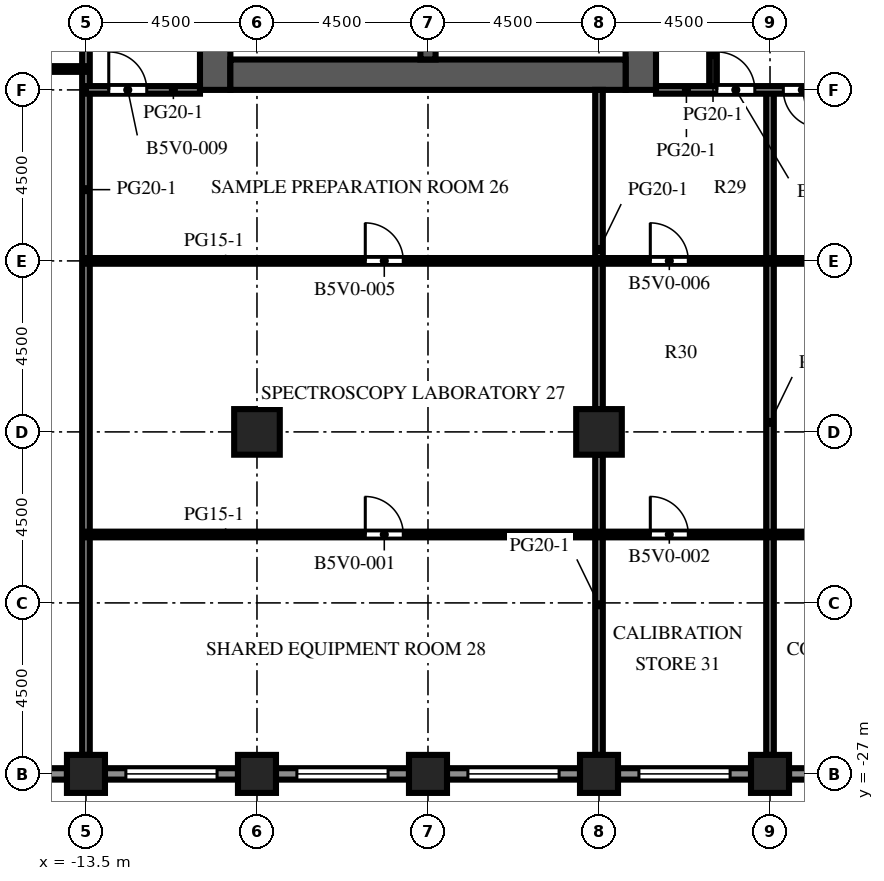
"""IFC4 building model, lengths in metres.
Left out: names, types, materials, properties, quantities, classifications, styles, units other than length and angle.
Written with IfcOpenShell. Run it as: python <this file> out.ifc"""

import sys

from ifc_helpers import new_model, si_unit, direction, frame, frame_2d, origin, origin_2d, place, context, subcontext, project, spatial, rectangle, extrude, element, fill, save


model = new_model("IFC4")
c1 = context("Model", 3, precision=1e-05, world=origin(), true_north=direction((0.0, 1.0)))
c2 = subcontext(c1, "Body", "Model", "MODEL_VIEW")
j1 = project(units=[si_unit("LENGTHUNIT", "METRE"), si_unit("PLANEANGLEUNIT", "RADIAN")], contexts=[c1])
p1 = place(None, origin())
s1 = spatial("IfcSite", under=j1, at=p1, CompositionType="ELEMENT")
p2 = place(p1, origin())
s2 = spatial("IfcBuilding", under=s1, at=p2, CompositionType="ELEMENT")
p3 = place(p2, frame((0.0, 0.0, 160.9)))
s3 = spatial("IfcBuildingStorey", under=s2, at=p3, CompositionType="ELEMENT", Elevation=160.9)
for number, where, z_axis, x_axis in (
    (1, (-13.5, -27.0, 0.0), (0.0, 0.0, 1.0), (1.0, 0.0, 0.0)),
    (2, (-9.0, -27.0, 0.0), (0.0, 0.0, 1.0), (1.0, 0.0, 0.0)),
    (3, (-4.5, -27.0, 0.0), (0.0, 0.0, 1.0), (1.0, 0.0, 0.0)),
    (4, (0.0, -27.0, 0.0), (0.0, 0.0, 1.0), (1.0, 0.0, 0.0)),
    (5, (4.5, -27.0, 0.0), (0.0, 0.0, 1.0), (1.0, 0.0, 0.0)),
):
    element("IfcColumn", number, at=place(p3, frame(where, z_axis=z_axis, x_axis=x_axis)), inside=s3, PredefinedType="COLUMN", context=c2, shape_type="SweptSolid", body=[
        extrude(rectangle(XDim=1.0, YDim=1.0, at=origin_2d()), origin(), (0.0, 0.0, 1.0), 4.1),
    ])
for number, where, z_axis, x_axis in (
    (6, (-9.0, -18.0, 0.0), (0.0, 0.0, 1.0), (1.0, 0.0, 0.0)),
    (7, (0.0, -18.0, 0.0), (0.0, 0.0, 1.0), (1.0, 0.0, 0.0)),
):
    element("IfcColumn", number, at=place(p3, frame(where, z_axis=z_axis, x_axis=x_axis)), inside=s3, PredefinedType="COLUMN", context=c2, shape_type="SweptSolid", body=[
        extrude(rectangle(XDim=1.2, YDim=1.2, at=origin_2d()), origin(), (0.0, 0.0, 1.0), 4.1),
    ])
p4 = place(p3, frame((-10.1, -9.0, 0.0), z_axis=(0.0, 0.0, 1.0), x_axis=(0.0, 1.0, 0.0)))
e8 = element("IfcWall", 8, at=p4, inside=s3, PredefinedType="SHEAR", context=c2, shape_type="SweptSolid", body=[
    extrude(rectangle(XDim=27.5, YDim=0.8, at=frame_2d((13.75, 0.0))), origin(), (0.0, 0.0, 1.0), 4.1),
])
p5 = place(p4, frame((12.55, 0.0, 0.0)))
e9 = element("IfcOpeningElement", 9, at=p5, cuts=e8, PredefinedType="OPENING", context=c2, shape_type="SweptSolid", body=[
    extrude(rectangle(XDim=2.4, YDim=2.4, at=frame_2d((1.2, 1.2))), frame((0.0, 0.41, 0.0), z_axis=(0.0, -1.0, 0.0), x_axis=(1.0, 0.0, 0.0)), (0.0, 0.0, 1.0), 0.82),
])
p6 = place(p4, frame((6.825, 0.0, 0.0)))
e10 = element("IfcOpeningElement", 10, at=p6, cuts=e8, PredefinedType="OPENING", context=c2, shape_type="SweptSolid", body=[
    extrude(rectangle(XDim=1.2, YDim=2.1, at=frame_2d((0.6, 1.05))), frame((0.0, 0.41, 0.0), z_axis=(0.0, -1.0, 0.0), x_axis=(1.0, 0.0, 0.0)), (0.0, 0.0, 1.0), 0.82),
])
p7 = place(p4, frame((19.475, 0.0, 0.0)))
e11 = element("IfcOpeningElement", 11, at=p7, cuts=e8, PredefinedType="OPENING", context=c2, shape_type="SweptSolid", body=[
    extrude(rectangle(XDim=1.2, YDim=2.1, at=frame_2d((0.6, 1.05))), frame((0.0, 0.41, 0.0), z_axis=(0.0, -1.0, 0.0), x_axis=(1.0, 0.0, 0.0)), (0.0, 0.0, 1.0), 0.82),
])
p8 = place(p3, frame((1.1, -9.0, 0.0), z_axis=(0.0, 0.0, 1.0), x_axis=(0.0, 1.0, 0.0)))
e12 = element("IfcWall", 12, at=p8, inside=s3, PredefinedType="SHEAR", context=c2, shape_type="SweptSolid", body=[
    extrude(rectangle(XDim=27.5, YDim=0.8, at=frame_2d((13.75, 0.0))), origin(), (0.0, 0.0, 1.0), 4.1),
])
p9 = place(p8, frame((12.55, 0.0, 0.0)))
e13 = element("IfcOpeningElement", 13, at=p9, cuts=e12, PredefinedType="OPENING", context=c2, shape_type="SweptSolid", body=[
    extrude(rectangle(XDim=2.4, YDim=2.4, at=frame_2d((1.2, 1.2))), frame((0.0, 0.41, 0.0), z_axis=(0.0, -1.0, 0.0), x_axis=(1.0, 0.0, 0.0)), (0.0, 0.0, 1.0), 0.82),
])
p10 = place(p8, frame((5.45, 0.0, 0.0)))
e14 = element("IfcOpeningElement", 14, at=p10, cuts=e12, PredefinedType="OPENING", context=c2, shape_type="SweptSolid", body=[
    extrude(rectangle(XDim=1.2, YDim=2.1, at=frame_2d((0.6, 1.05))), frame((0.0, 0.41, 0.0), z_axis=(0.0, -1.0, 0.0), x_axis=(1.0, 0.0, 0.0)), (0.0, 0.0, 1.0), 0.82),
])
p11 = place(p8, frame((19.45, 0.0, 0.0)))
e15 = element("IfcOpeningElement", 15, at=p11, cuts=e12, PredefinedType="OPENING", context=c2, shape_type="SweptSolid", body=[
    extrude(rectangle(XDim=1.0, YDim=2.1, at=frame_2d((0.5, 1.05))), frame((0.0, 0.41, 0.0), z_axis=(0.0, -1.0, 0.0), x_axis=(1.0, 0.0, 0.0)), (0.0, 0.0, 1.0), 0.82),
])
p12 = place(p8, frame((21.137, 0.0, 0.0)))
e16 = element("IfcOpeningElement", 16, at=p12, cuts=e12, PredefinedType="OPENING", context=c2, shape_type="SweptSolid", body=[
    extrude(rectangle(XDim=1.0, YDim=2.1, at=frame_2d((0.5, 1.05))), frame((0.0, 0.41, 0.0), z_axis=(0.0, -1.0, 0.0), x_axis=(1.0, 0.0, 0.0)), (0.0, 0.0, 1.0), 0.82),
])
p13 = place(p8, frame((23.2, 0.0, 0.0)))
e17 = element("IfcOpeningElement", 17, at=p13, cuts=e12, PredefinedType="OPENING", context=c2, shape_type="SweptSolid", body=[
    extrude(rectangle(XDim=1.0, YDim=2.1, at=frame_2d((0.5, 1.05))), frame((0.0, 0.41, 0.0), z_axis=(0.0, -1.0, 0.0), x_axis=(1.0, 0.0, 0.0)), (0.0, 0.0, 1.0), 0.82),
])
p14 = place(p8, frame((25.262, 0.0, 0.0)))
e18 = element("IfcOpeningElement", 18, at=p14, cuts=e12, PredefinedType="OPENING", context=c2, shape_type="SweptSolid", body=[
    extrude(rectangle(XDim=1.0, YDim=2.1, at=frame_2d((0.5, 1.05))), frame((0.0, 0.41, 0.0), z_axis=(0.0, -1.0, 0.0), x_axis=(1.0, 0.0, 0.0)), (0.0, 0.0, 1.0), 0.82),
])
p15 = place(p3, frame((-9.7, -8.6, 0.0), z_axis=(0.0, 0.0, 1.0), x_axis=(1.0, 0.0, 0.0)))
e19 = element("IfcWall", 19, at=p15, inside=s3, PredefinedType="SHEAR", context=c2, shape_type="SweptSolid", body=[
    extrude(rectangle(XDim=10.4, YDim=0.8, at=frame_2d((5.2, 0.0))), origin(), (0.0, 0.0, 1.0), 4.1),
])
p16 = place(p3, frame((-4.5, -8.2, 0.0), z_axis=(0.0, 0.0, 1.0), x_axis=(0.0, 1.0, 0.0)))
e20 = element("IfcWall", 20, at=p16, inside=s3, PredefinedType="SHEAR", context=c2, shape_type="SweptSolid", body=[
    extrude(rectangle(XDim=7.5, YDim=0.4, at=frame_2d((3.75, 0.0))), origin(), (0.0, 0.0, 1.0), 4.1),
])
p17 = place(p3, frame((-14.0, -27.0, 0.0), z_axis=(0.0, 0.0, 1.0), x_axis=(-1.0, 0.0, 0.0)))
e21 = element("IfcWall", 21, at=p17, inside=s3, PredefinedType="SOLIDWALL", context=c2, shape_type="SweptSolid", body=[
    extrude(rectangle(XDim=3.5, YDim=0.3, at=frame_2d((1.75, 0.0))), origin(), (0.0, 0.0, 1.0), 2.85),
])
p18 = place(p17, frame((1.25, 0.0, 0.0)))
e22 = element("IfcOpeningElement", 22, at=p18, cuts=e21, PredefinedType="OPENING", context=c2, shape_type="SweptSolid", body=[
    extrude(rectangle(XDim=1.0, YDim=2.2, at=frame_2d((0.5, 1.1))), frame((0.0, 0.16, 0.0), z_axis=(0.0, -1.0, 0.0), x_axis=(1.0, 0.0, 0.0)), (0.0, 0.0, 1.0), 0.32),
])
p19 = place(p3, frame((-9.5, -27.0, 0.0), z_axis=(0.0, 0.0, 1.0), x_axis=(-1.0, 0.0, 0.0)))
e23 = element("IfcWall", 23, at=p19, inside=s3, PredefinedType="SOLIDWALL", context=c2, shape_type="SweptSolid", body=[
    extrude(rectangle(XDim=3.5, YDim=0.3, at=frame_2d((1.75, 0.0))), origin(), (0.0, 0.0, 1.0), 2.85),
])
p20 = place(p19, frame((0.55, 0.0, 0.8)))
e24 = element("IfcOpeningElement", 24, at=p20, cuts=e23, PredefinedType="OPENING", context=c2, shape_type="SweptSolid", body=[
    extrude(rectangle(XDim=2.4, YDim=1.7, at=frame_2d((1.2, 0.85))), frame((0.0, 0.16, 0.0), z_axis=(0.0, -1.0, 0.0), x_axis=(1.0, 0.0, 0.0)), (0.0, 0.0, 1.0), 0.32),
])
p21 = place(p3, frame((-5.0, -27.0, 0.0), z_axis=(0.0, 0.0, 1.0), x_axis=(-1.0, 0.0, 0.0)))
e25 = element("IfcWall", 25, at=p21, inside=s3, PredefinedType="SOLIDWALL", context=c2, shape_type="SweptSolid", body=[
    extrude(rectangle(XDim=3.5, YDim=0.3, at=frame_2d((1.75, 0.0))), origin(), (0.0, 0.0, 1.0), 2.85),
])
p22 = place(p21, frame((0.55, 0.0, 0.8)))
e26 = element("IfcOpeningElement", 26, at=p22, cuts=e25, PredefinedType="OPENING", context=c2, shape_type="SweptSolid", body=[
    extrude(rectangle(XDim=2.4, YDim=1.7, at=frame_2d((1.2, 0.85))), frame((0.0, 0.16, 0.0), z_axis=(0.0, -1.0, 0.0), x_axis=(1.0, 0.0, 0.0)), (0.0, 0.0, 1.0), 0.32),
])
p23 = place(p3, frame((-0.5, -27.0, 0.0), z_axis=(0.0, 0.0, 1.0), x_axis=(-1.0, 0.0, 0.0)))
e27 = element("IfcWall", 27, at=p23, inside=s3, PredefinedType="SOLIDWALL", context=c2, shape_type="SweptSolid", body=[
    extrude(rectangle(XDim=3.5, YDim=0.3, at=frame_2d((1.75, 0.0))), origin(), (0.0, 0.0, 1.0), 2.85),
])
p24 = place(p23, frame((0.55, 0.0, 0.8)))
e28 = element("IfcOpeningElement", 28, at=p24, cuts=e27, PredefinedType="OPENING", context=c2, shape_type="SweptSolid", body=[
    extrude(rectangle(XDim=2.4, YDim=1.7, at=frame_2d((1.2, 0.85))), frame((0.0, 0.16, 0.0), z_axis=(0.0, -1.0, 0.0), x_axis=(1.0, 0.0, 0.0)), (0.0, 0.0, 1.0), 0.32),
])
p25 = place(p3, frame((4.0, -27.0, 0.0), z_axis=(0.0, 0.0, 1.0), x_axis=(-1.0, 0.0, 0.0)))
e29 = element("IfcWall", 29, at=p25, inside=s3, PredefinedType="SOLIDWALL", context=c2, shape_type="SweptSolid", body=[
    extrude(rectangle(XDim=3.5, YDim=0.3, at=frame_2d((1.75, 0.0))), origin(), (0.0, 0.0, 1.0), 2.85),
])
p26 = place(p25, frame((0.55, 0.0, 0.8)))
e30 = element("IfcOpeningElement", 30, at=p26, cuts=e29, PredefinedType="OPENING", context=c2, shape_type="SweptSolid", body=[
    extrude(rectangle(XDim=2.4, YDim=1.7, at=frame_2d((1.2, 0.85))), frame((0.0, 0.16, 0.0), z_axis=(0.0, -1.0, 0.0), x_axis=(1.0, 0.0, 0.0)), (0.0, 0.0, 1.0), 0.32),
])
p27 = place(p3, frame((8.5, -27.0, 0.0), z_axis=(0.0, 0.0, 1.0), x_axis=(-1.0, 0.0, 0.0)))
e31 = element("IfcWall", 31, at=p27, inside=s3, PredefinedType="SOLIDWALL", context=c2, shape_type="SweptSolid", body=[
    extrude(rectangle(XDim=3.5, YDim=0.3, at=frame_2d((1.75, 0.0))), origin(), (0.0, 0.0, 1.0), 2.85),
])
p28 = place(p27, frame((0.55, 0.0, 0.8)))
e32 = element("IfcOpeningElement", 32, at=p28, cuts=e31, PredefinedType="OPENING", context=c2, shape_type="SweptSolid", body=[
    extrude(rectangle(XDim=2.4, YDim=1.7, at=frame_2d((1.2, 0.85))), frame((0.0, 0.16, 0.0), z_axis=(0.0, -1.0, 0.0), x_axis=(1.0, 0.0, 0.0)), (0.0, 0.0, 1.0), 0.32),
])
p29 = place(p3, frame((-13.5, -26.5, 0.0), z_axis=(0.0, 0.0, 1.0), x_axis=(0.0, 1.0, 0.0)))
e33 = element("IfcWall", 33, at=p29, inside=s3, PredefinedType="PARTITIONING", context=c2, shape_type="SweptSolid", body=[
    extrude(rectangle(XDim=29.75, YDim=0.2, at=frame_2d((14.875, 0.0))), origin(), (0.0, 0.0, 1.0), 3.65),
])
p30 = place(p3, frame((0.0, -26.5, 0.0), z_axis=(0.0, 0.0, 1.0), x_axis=(0.0, 1.0, 0.0)))
e34 = element("IfcWall", 34, at=p30, inside=s3, PredefinedType="PARTITIONING", context=c2, shape_type="SweptSolid", body=[
    extrude(rectangle(XDim=7.9, YDim=0.2, at=frame_2d((3.95, 0.0))), origin(), (0.0, 0.0, 1.0), 3.65),
])
p31 = place(p3, frame((0.0, -17.4, 0.0), z_axis=(0.0, 0.0, 1.0), x_axis=(0.0, 1.0, 0.0)))
e35 = element("IfcWall", 35, at=p31, inside=s3, PredefinedType="PARTITIONING", context=c2, shape_type="SweptSolid", body=[
    extrude(rectangle(XDim=8.4, YDim=0.2, at=frame_2d((4.2, 0.0))), origin(), (0.0, 0.0, 1.0), 3.65),
])
p32 = place(p3, frame((3.0, -9.0, 0.0), z_axis=(0.0, 0.0, 1.0), x_axis=(0.0, 1.0, 0.0)))
e36 = element("IfcWall", 36, at=p32, inside=s3, PredefinedType="PARTITIONING", context=c2, shape_type="SweptSolid", body=[
    extrude(rectangle(XDim=4.5, YDim=0.2, at=frame_2d((2.25, 0.0))), origin(), (0.0, 0.0, 1.0), 3.65),
])
p33 = place(p32, frame((1.85, 0.0, 0.0)))
e37 = element("IfcOpeningElement", 37, at=p33, cuts=e36, PredefinedType="OPENING", context=c2, shape_type="SweptSolid", body=[
    extrude(rectangle(XDim=1.0, YDim=2.1, at=frame_2d((0.5, 1.05))), frame((0.0, 0.11, 0.0), z_axis=(0.0, -1.0, 0.0), x_axis=(1.0, 0.0, 0.0)), (0.0, 0.0, 1.0), 0.22),
])
p34 = place(p3, frame((4.5, -26.5, 0.0), z_axis=(0.0, 0.0, 1.0), x_axis=(0.0, 1.0, 0.0)))
e38 = element("IfcWall", 38, at=p34, inside=s3, PredefinedType="PARTITIONING", context=c2, shape_type="SweptSolid", body=[
    extrude(rectangle(XDim=17.5, YDim=0.2, at=frame_2d((8.75, 0.0))), origin(), (0.0, 0.0, 1.0), 3.65),
])
p35 = place(p3, frame((21.0, -20.7, 0.0), z_axis=(0.0, 0.0, 1.0), x_axis=(-1.0, 0.0, 0.0)))
e39 = element("IfcWall", 39, at=p35, inside=s3, PredefinedType="PARTITIONING", context=c2, shape_type="SweptSolid", body=[
    extrude(rectangle(XDim=34.5, YDim=0.15, at=frame_2d((17.25, 0.0))), origin(), (0.0, 0.0, 1.0), 3.65),
])
p36 = place(p35, frame((26.15, 0.0, 0.0)))
e40 = element("IfcOpeningElement", 40, at=p36, cuts=e39, PredefinedType="OPENING", context=c2, shape_type="SweptSolid", body=[
    extrude(rectangle(XDim=1.0, YDim=2.1, at=frame_2d((0.5, 1.05))), frame((0.0, 0.085, 0.0), z_axis=(0.0, -1.0, 0.0), x_axis=(1.0, 0.0, 0.0)), (0.0, 0.0, 1.0), 0.17),
])
p37 = place(p35, frame((18.65, 0.0, 0.0)))
e41 = element("IfcOpeningElement", 41, at=p37, cuts=e39, PredefinedType="OPENING", context=c2, shape_type="SweptSolid", body=[
    extrude(rectangle(XDim=1.0, YDim=2.1, at=frame_2d((0.5, 1.05))), frame((0.0, 0.085, 0.0), z_axis=(0.0, -1.0, 0.0), x_axis=(1.0, 0.0, 0.0)), (0.0, 0.0, 1.0), 0.17),
])
p38 = place(p35, frame((10.65, 0.0, 0.0)))
e42 = element("IfcOpeningElement", 42, at=p38, cuts=e39, PredefinedType="OPENING", context=c2, shape_type="SweptSolid", body=[
    extrude(rectangle(XDim=1.0, YDim=2.1, at=frame_2d((0.5, 1.05))), frame((0.0, 0.085, 0.0), z_axis=(0.0, -1.0, 0.0), x_axis=(1.0, 0.0, 0.0)), (0.0, 0.0, 1.0), 0.17),
])
p39 = place(p35, frame((4.15, 0.0, 0.0)))
e43 = element("IfcOpeningElement", 43, at=p39, cuts=e39, PredefinedType="OPENING", context=c2, shape_type="SweptSolid", body=[
    extrude(rectangle(XDim=1.0, YDim=2.1, at=frame_2d((0.5, 1.05))), frame((0.0, 0.085, 0.0), z_axis=(0.0, -1.0, 0.0), x_axis=(1.0, 0.0, 0.0)), (0.0, 0.0, 1.0), 0.17),
])
p40 = place(p3, frame((21.0, -13.5, 0.0), z_axis=(0.0, 0.0, 1.0), x_axis=(-1.0, 0.0, 0.0)))
e44 = element("IfcWall", 44, at=p40, inside=s3, PredefinedType="PARTITIONING", context=c2, shape_type="SweptSolid", body=[
    extrude(rectangle(XDim=34.5, YDim=0.15, at=frame_2d((17.25, 0.0))), origin(), (0.0, 0.0, 1.0), 3.65),
])
p41 = place(p40, frame((26.15, 0.0, 0.0)))
e45 = element("IfcOpeningElement", 45, at=p41, cuts=e44, PredefinedType="OPENING", context=c2, shape_type="SweptSolid", body=[
    extrude(rectangle(XDim=1.0, YDim=2.1, at=frame_2d((0.5, 1.05))), frame((0.0, 0.085, 0.0), z_axis=(0.0, -1.0, 0.0), x_axis=(1.0, 0.0, 0.0)), (0.0, 0.0, 1.0), 0.17),
])
p42 = place(p40, frame((18.65, 0.0, 0.0)))
e46 = element("IfcOpeningElement", 46, at=p42, cuts=e44, PredefinedType="OPENING", context=c2, shape_type="SweptSolid", body=[
    extrude(rectangle(XDim=1.0, YDim=2.1, at=frame_2d((0.5, 1.05))), frame((0.0, 0.085, 0.0), z_axis=(0.0, -1.0, 0.0), x_axis=(1.0, 0.0, 0.0)), (0.0, 0.0, 1.0), 0.17),
])
p43 = place(p40, frame((11.4, 0.0, 0.0)))
e47 = element("IfcOpeningElement", 47, at=p43, cuts=e44, PredefinedType="OPENING", context=c2, shape_type="SweptSolid", body=[
    extrude(rectangle(XDim=1.0, YDim=2.1, at=frame_2d((0.5, 1.05))), frame((0.0, 0.085, 0.0), z_axis=(0.0, -1.0, 0.0), x_axis=(1.0, 0.0, 0.0)), (0.0, 0.0, 1.0), 0.17),
])
p44 = place(p40, frame((3.15, 0.0, 0.0)))
e48 = element("IfcOpeningElement", 48, at=p44, cuts=e44, PredefinedType="OPENING", context=c2, shape_type="SweptSolid", body=[
    extrude(rectangle(XDim=1.0, YDim=2.1, at=frame_2d((0.5, 1.05))), frame((0.0, 0.085, 0.0), z_axis=(0.0, -1.0, 0.0), x_axis=(1.0, 0.0, 0.0)), (0.0, 0.0, 1.0), 0.17),
])
p45 = place(p3, frame((-10.5, -9.0, 0.0), z_axis=(0.0, 0.0, 1.0), x_axis=(-1.0, 0.0, 0.0)))
e49 = element("IfcWall", 49, at=p45, inside=s3, PredefinedType="PARTITIONING", context=c2, shape_type="SweptSolid", body=[
    extrude(rectangle(XDim=3.0, YDim=0.2, at=frame_2d((1.5, 0.0))), origin(), (0.0, 0.0, 1.0), 3.65),
])
p46 = place(p45, frame((1.4, 0.0, 0.0)))
e50 = element("IfcOpeningElement", 50, at=p46, cuts=e49, PredefinedType="OPENING", context=c2, shape_type="SweptSolid", body=[
    extrude(rectangle(XDim=1.0, YDim=2.1, at=frame_2d((0.5, 1.05))), frame((0.0, 0.11, 0.0), z_axis=(0.0, -1.0, 0.0), x_axis=(1.0, 0.0, 0.0)), (0.0, 0.0, 1.0), 0.22),
])
p47 = place(p3, frame((6.0, -9.0, 0.0), z_axis=(0.0, 0.0, 1.0), x_axis=(-1.0, 0.0, 0.0)))
e51 = element("IfcWall", 51, at=p47, inside=s3, PredefinedType="PARTITIONING", context=c2, shape_type="SweptSolid", body=[
    extrude(rectangle(XDim=4.5, YDim=0.2, at=frame_2d((2.25, 0.0))), origin(), (0.0, 0.0, 1.0), 3.65),
])
p48 = place(p47, frame((1.9, 0.0, 0.0)))
e52 = element("IfcOpeningElement", 52, at=p48, cuts=e51, PredefinedType="OPENING", context=c2, shape_type="SweptSolid", body=[
    extrude(rectangle(XDim=1.0, YDim=2.1, at=frame_2d((0.5, 1.05))), frame((0.0, 0.11, 0.0), z_axis=(0.0, -1.0, 0.0), x_axis=(1.0, 0.0, 0.0)), (0.0, 0.0, 1.0), 0.22),
])
p49 = place(p47, frame((0.15, 0.0, 0.0)))
e53 = element("IfcOpeningElement", 53, at=p49, cuts=e51, PredefinedType="OPENING", context=c2, shape_type="SweptSolid", body=[
    extrude(rectangle(XDim=1.0, YDim=2.1, at=frame_2d((0.5, 1.05))), frame((0.0, 0.11, 0.0), z_axis=(0.0, -1.0, 0.0), x_axis=(1.0, 0.0, 0.0)), (0.0, 0.0, 1.0), 0.22),
])
p50 = place(p3, frame((-17.4, -8.45, 0.0), z_axis=(0.0, 0.0, 1.0), x_axis=(1.0, 0.0, 0.0)))
e54 = element("IfcWall", 54, at=p50, inside=s3, PredefinedType="PARTITIONING", context=c2, shape_type="SweptSolid", body=[
    extrude(rectangle(XDim=3.9, YDim=0.15, at=frame_2d((1.95, 0.0))), origin(), (0.0, 0.0, 1.0), 3.65),
])
p51 = place(p20, origin())
e55 = element("IfcWindow", 55, at=p51, inside=s3, PartitioningType="SINGLE_PANEL", PredefinedType="WINDOW", context=c2, shape_type="SweptSolid", body=[
    extrude(rectangle(XDim=2.4, YDim=1.7, at=frame_2d((1.2, 0.85))), frame((0.0, 0.03, 0.0), z_axis=(0.0, -1.0, 0.0), x_axis=(1.0, 0.0, 0.0)), (0.0, 0.0, 1.0), 0.06),
])
fill(e24, e55)
p52 = place(p22, origin())
e56 = element("IfcWindow", 56, at=p52, inside=s3, PartitioningType="SINGLE_PANEL", PredefinedType="WINDOW", context=c2, shape_type="SweptSolid", body=[
    extrude(rectangle(XDim=2.4, YDim=1.7, at=frame_2d((1.2, 0.85))), frame((0.0, 0.03, 0.0), z_axis=(0.0, -1.0, 0.0), x_axis=(1.0, 0.0, 0.0)), (0.0, 0.0, 1.0), 0.06),
])
fill(e26, e56)
p53 = place(p24, origin())
e57 = element("IfcWindow", 57, at=p53, inside=s3, PartitioningType="SINGLE_PANEL", PredefinedType="WINDOW", context=c2, shape_type="SweptSolid", body=[
    extrude(rectangle(XDim=2.4, YDim=1.7, at=frame_2d((1.2, 0.85))), frame((0.0, 0.03, 0.0), z_axis=(0.0, -1.0, 0.0), x_axis=(1.0, 0.0, 0.0)), (0.0, 0.0, 1.0), 0.06),
])
fill(e28, e57)
p54 = place(p26, origin())
e58 = element("IfcWindow", 58, at=p54, inside=s3, PartitioningType="SINGLE_PANEL", PredefinedType="WINDOW", context=c2, shape_type="SweptSolid", body=[
    extrude(rectangle(XDim=2.4, YDim=1.7, at=frame_2d((1.2, 0.85))), frame((0.0, 0.03, 0.0), z_axis=(0.0, -1.0, 0.0), x_axis=(1.0, 0.0, 0.0)), (0.0, 0.0, 1.0), 0.06),
])
fill(e30, e58)
p55 = place(p36, origin())
e59 = element("IfcDoor", 59, at=p55, inside=s3, OperationType="SINGLE_SWING_RIGHT", PredefinedType="DOOR", context=c2, shape_type="SweptSolid", body=[
    extrude(rectangle(XDim=1.0, YDim=2.1, at=frame_2d((0.5, 1.05))), frame((0.0, 0.025, 0.0), z_axis=(0.0, -1.0, 0.0), x_axis=(1.0, 0.0, 0.0)), (0.0, 0.0, 1.0), 0.05),
])
fill(e40, e59)
p56 = place(p37, origin())
e60 = element("IfcDoor", 60, at=p56, inside=s3, OperationType="SINGLE_SWING_RIGHT", PredefinedType="DOOR", context=c2, shape_type="SweptSolid", body=[
    extrude(rectangle(XDim=1.0, YDim=2.1, at=frame_2d((0.5, 1.05))), frame((0.0, 0.025, 0.0), z_axis=(0.0, -1.0, 0.0), x_axis=(1.0, 0.0, 0.0)), (0.0, 0.0, 1.0), 0.05),
])
fill(e41, e60)
p57 = place(p41, origin())
e61 = element("IfcDoor", 61, at=p57, inside=s3, OperationType="SINGLE_SWING_RIGHT", PredefinedType="DOOR", context=c2, shape_type="SweptSolid", body=[
    extrude(rectangle(XDim=1.0, YDim=2.1, at=frame_2d((0.5, 1.05))), frame((0.0, 0.025, 0.0), z_axis=(0.0, -1.0, 0.0), x_axis=(1.0, 0.0, 0.0)), (0.0, 0.0, 1.0), 0.05),
])
fill(e45, e61)
p58 = place(p42, origin())
e62 = element("IfcDoor", 62, at=p58, inside=s3, OperationType="SINGLE_SWING_RIGHT", PredefinedType="DOOR", context=c2, shape_type="SweptSolid", body=[
    extrude(rectangle(XDim=1.0, YDim=2.1, at=frame_2d((0.5, 1.05))), frame((0.0, 0.025, 0.0), z_axis=(0.0, -1.0, 0.0), x_axis=(1.0, 0.0, 0.0)), (0.0, 0.0, 1.0), 0.05),
])
fill(e46, e62)
p59 = place(p46, origin())
e63 = element("IfcDoor", 63, at=p59, inside=s3, OperationType="SINGLE_SWING_RIGHT", PredefinedType="DOOR", context=c2, shape_type="SweptSolid", body=[
    extrude(rectangle(XDim=1.0, YDim=2.1, at=frame_2d((0.5, 1.05))), frame((0.0, 0.025, 0.0), z_axis=(0.0, -1.0, 0.0), x_axis=(1.0, 0.0, 0.0)), (0.0, 0.0, 1.0), 0.05),
])
fill(e50, e63)
p60 = place(p48, origin())
e64 = element("IfcDoor", 64, at=p60, inside=s3, OperationType="SINGLE_SWING_RIGHT", PredefinedType="DOOR", context=c2, shape_type="SweptSolid", body=[
    extrude(rectangle(XDim=1.0, YDim=2.1, at=frame_2d((0.5, 1.05))), frame((0.0, 0.025, 0.0), z_axis=(0.0, -1.0, 0.0), x_axis=(1.0, 0.0, 0.0)), (0.0, 0.0, 1.0), 0.05),
])
fill(e52, e64)
p61 = place(p49, origin())
e65 = element("IfcDoor", 65, at=p61, inside=s3, OperationType="SINGLE_SWING_LEFT", PredefinedType="DOOR", context=c2, shape_type="SweptSolid", body=[
    extrude(rectangle(XDim=1.0, YDim=2.1, at=frame_2d((0.5, 1.05))), frame((0.0, 0.025, 0.0), z_axis=(0.0, -1.0, 0.0), x_axis=(1.0, 0.0, 0.0)), (0.0, 0.0, 1.0), 0.05),
])
fill(e53, e65)
save(model, sys.argv[1])
